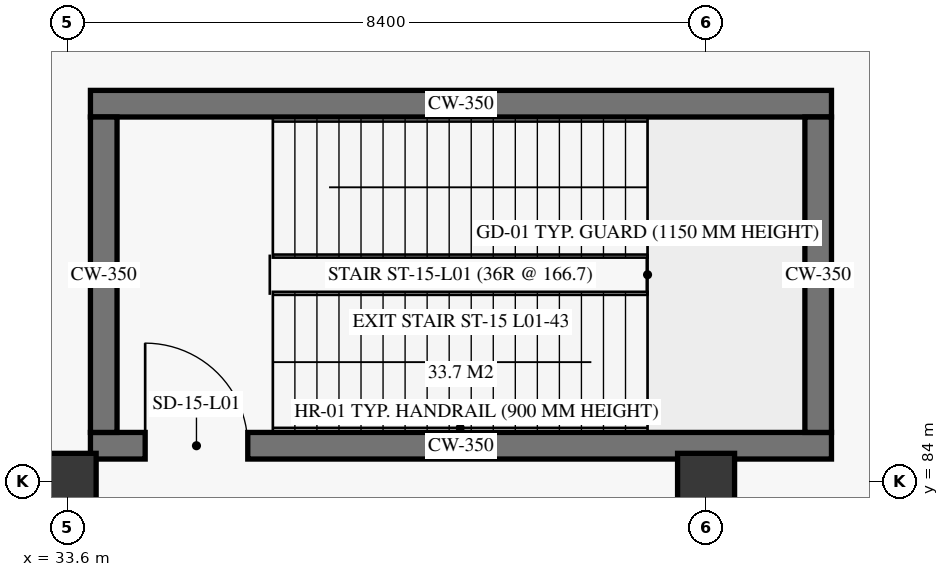
"""IFC4 building model, lengths in metres.
Left out: names, types, materials, properties, quantities, classifications, styles, units other than length and angle.
Written with IfcOpenShell. Run it as: python <this file> out.ifc"""

import sys

from ifc_helpers import new_model, si_unit, direction, frame, frame_2d, origin, origin_2d, place, context, subcontext, project, spatial, rectangle, extrude, element, fill, save


model = new_model("IFC4")
c1 = context("Model", 3, precision=1e-05, world=origin(), true_north=direction((0.0, 1.0)))
c2 = subcontext(c1, "Body", "Model", "MODEL_VIEW")
j1 = project(units=[si_unit("LENGTHUNIT", "METRE"), si_unit("PLANEANGLEUNIT", "RADIAN")], contexts=[c1])
p1 = place(None, origin())
s1 = spatial("IfcSite", under=j1, at=p1, CompositionType="ELEMENT")
p2 = place(p1, origin())
s2 = spatial("IfcBuilding", under=s1, at=p2, CompositionType="ELEMENT")
p3 = place(p2, origin())
s3 = spatial("IfcBuildingStorey", under=s2, at=p3, CompositionType="ELEMENT", Elevation=0.0)
for number, where, z_axis, x_axis in (
    (1, (33.6, 84.0, 0.0), (0.0, 0.0, 1.0), (1.0, 0.0, 0.0)),
    (2, (42.0, 84.0, 0.0), (0.0, 0.0, 1.0), (1.0, 0.0, 0.0)),
):
    element("IfcColumn", number, at=place(p3, frame(where, z_axis=z_axis, x_axis=x_axis)), inside=s3, PredefinedType="COLUMN", context=c2, shape_type="SweptSolid", body=[
        extrude(rectangle(XDim=0.75, YDim=0.75, at=origin_2d()), origin(), (0.0, 0.0, 1.0), 5.7),
    ])
p4 = place(p3, frame((33.9, 84.475, 0.0), z_axis=(0.0, 0.0, 1.0), x_axis=(1.0, 0.0, 0.0)))
e3 = element("IfcWall", 3, at=p4, inside=s3, PredefinedType="SHEAR", context=c2, shape_type="SweptSolid", body=[
    extrude(rectangle(XDim=9.75, YDim=0.35, at=frame_2d((4.875, 0.0))), origin(), (0.0, 0.0, 1.0), 5.7),
])
p5 = place(p4, frame((0.72, 0.0, 0.0)))
e4 = element("IfcOpeningElement", 4, at=p5, cuts=e3, PredefinedType="OPENING", context=c2, shape_type="SweptSolid", body=[
    extrude(rectangle(XDim=1.35, YDim=2.25, at=frame_2d((0.675, 1.125))), frame((0.0, 0.185, 0.0), z_axis=(0.0, -1.0, 0.0), x_axis=(1.0, 0.0, 0.0)), (0.0, 0.0, 1.0), 0.37),
])
p6 = place(p3, frame((33.9, 88.975, 0.0), z_axis=(0.0, 0.0, 1.0), x_axis=(1.0, 0.0, 0.0)))
e5 = element("IfcWall", 5, at=p6, inside=s3, PredefinedType="SHEAR", context=c2, shape_type="SweptSolid", body=[
    extrude(rectangle(XDim=9.75, YDim=0.35, at=frame_2d((4.875, 0.0))), origin(), (0.0, 0.0, 1.0), 5.7),
])
for number, where, z_axis, x_axis in (
    (6, (34.075, 84.65, 0.0), (0.0, 0.0, 1.0), (0.0, 1.0, 0.0)),
    (7, (43.475, 84.65, 0.0), (0.0, 0.0, 1.0), (0.0, 1.0, 0.0)),
):
    element("IfcWall", number, at=place(p3, frame(where, z_axis=z_axis, x_axis=x_axis)), inside=s3, PredefinedType="SHEAR", context=c2, shape_type="SweptSolid", body=[
        extrude(rectangle(XDim=4.15, YDim=0.35, at=frame_2d((2.075, 0.0))), origin(), (0.0, 0.0, 1.0), 5.7),
    ])
p7 = place(p5, origin())
e8 = element("IfcDoor", 8, at=p7, inside=s3, OperationType="SINGLE_SWING_LEFT", PredefinedType="DOOR", context=c2, shape_type="SweptSolid", body=[
    extrude(rectangle(XDim=1.35, YDim=2.25, at=frame_2d((0.675, 1.125))), frame((0.0, 0.025, 0.0), z_axis=(0.0, -1.0, 0.0), x_axis=(1.0, 0.0, 0.0)), (0.0, 0.0, 1.0), 0.05),
])
fill(e4, e8)
save(model, sys.argv[1])
